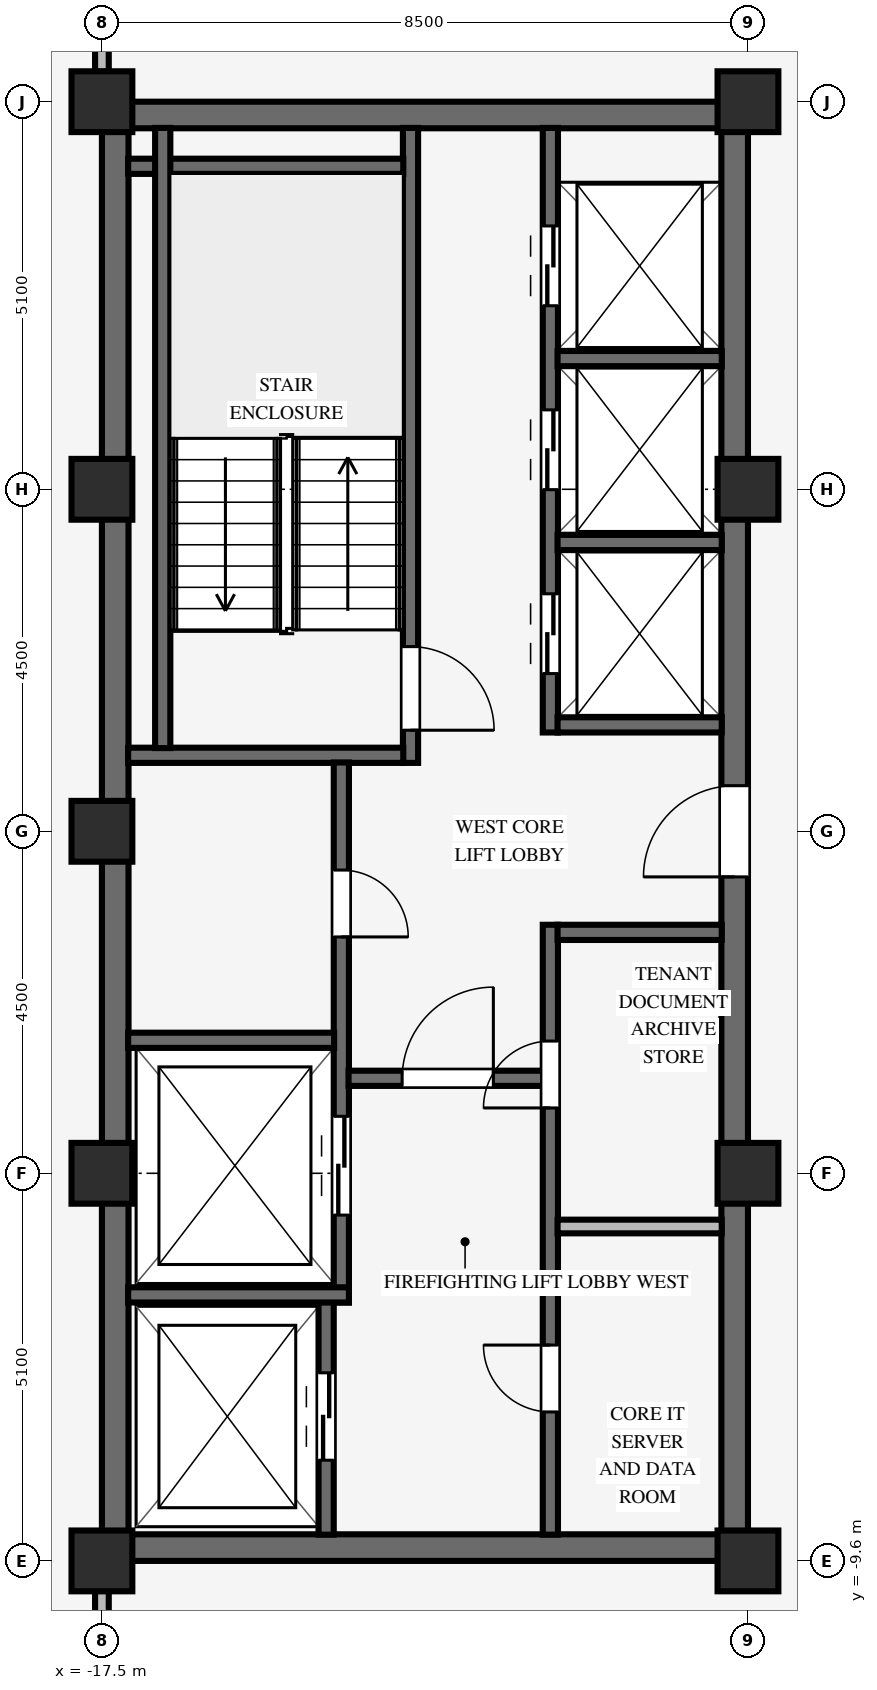
"""IFC4 building model, lengths in metres.
Left out: names, types, materials, properties, quantities, classifications, styles, units other than length and angle.
Written with IfcOpenShell. Run it as: python <this file> out.ifc"""

import sys

from ifc_helpers import new_model, si_unit, direction, frame, frame_2d, origin, origin_2d, place, context, subcontext, project, spatial, rectangle, extrude, source, transform, mapped, element, fill, save


model = new_model("IFC4")
c1 = context("Model", 3, precision=1e-05, world=origin(), true_north=direction((0.0, 1.0)))
c2 = subcontext(c1, "Body", "Model", "MODEL_VIEW")
j1 = project(units=[si_unit("LENGTHUNIT", "METRE"), si_unit("PLANEANGLEUNIT", "RADIAN")], contexts=[c1])
p1 = place(None, origin())
s1 = spatial("IfcSite", under=j1, at=p1, CompositionType="ELEMENT")
p2 = place(p1, origin())
s2 = spatial("IfcBuilding", under=s1, at=p2, CompositionType="ELEMENT")
p3 = place(p2, frame((0.0, 0.0, 245.65)))
s3 = spatial("IfcBuildingStorey", under=s2, at=p3, CompositionType="ELEMENT", Elevation=245.65)
for number, where, z_axis, x_axis in (
    (1, (-17.5, -9.425, 0.0), (0.0, 0.0, 1.0), (1.0, 0.0, 0.0)),
    (2, (-17.5, 9.425, 0.0), (0.0, 0.0, 1.0), (1.0, 0.0, 0.0)),
):
    element("IfcWall", number, at=place(p3, frame(where, z_axis=z_axis, x_axis=x_axis)), inside=s3, PredefinedType="SHEAR", context=c2, shape_type="SweptSolid", body=[
        extrude(rectangle(XDim=8.5, YDim=0.35, at=frame_2d((4.25, 0.0))), origin(), (0.0, 0.0, 1.0), 3.37),
    ])
p4 = place(p3, frame((-17.325, -9.255, 0.0), z_axis=(0.0, 0.0, 1.0), x_axis=(0.0, 1.0, 0.0)))
e3 = element("IfcWall", 3, at=p4, inside=s3, PredefinedType="SHEAR", context=c2, shape_type="SweptSolid", body=[
    extrude(rectangle(XDim=18.51, YDim=0.35, at=frame_2d((9.255, 0.0))), origin(), (0.0, 0.0, 1.0), 3.37),
])
p5 = place(p3, frame((-9.175, -9.255, 0.0), z_axis=(0.0, 0.0, 1.0), x_axis=(0.0, 1.0, 0.0)))
e4 = element("IfcWall", 4, at=p5, inside=s3, PredefinedType="SHEAR", context=c2, shape_type="SweptSolid", body=[
    extrude(rectangle(XDim=18.51, YDim=0.35, at=frame_2d((9.255, 0.0))), origin(), (0.0, 0.0, 1.0), 3.37),
])
p6 = place(p5, frame((8.655, 0.0, 0.0)))
e5 = element("IfcOpeningElement", 5, at=p6, cuts=e4, PredefinedType="OPENING", context=c2, shape_type="SweptSolid", body=[
    extrude(rectangle(XDim=1.2, YDim=2.15, at=frame_2d((0.6, 1.075))), frame((0.0, 0.185, 0.0), z_axis=(0.0, -1.0, 0.0), x_axis=(1.0, 0.0, 0.0)), (0.0, 0.0, 1.0), 0.37),
])
for number, where, z_axis, x_axis in (
    (6, (-17.5, -9.6, 0.0), (0.0, 0.0, 1.0), (1.0, 0.0, 0.0)),
    (7, (-17.5, -4.5, 0.0), (0.0, 0.0, 1.0), (1.0, 0.0, 0.0)),
    (8, (-17.5, 4.5, 0.0), (0.0, 0.0, 1.0), (1.0, 0.0, 0.0)),
    (9, (-17.5, 9.6, 0.0), (0.0, 0.0, 1.0), (1.0, 0.0, 0.0)),
    (10, (-9.0, -9.6, 0.0), (0.0, 0.0, 1.0), (1.0, 0.0, 0.0)),
    (11, (-9.0, -4.5, 0.0), (0.0, 0.0, 1.0), (1.0, 0.0, 0.0)),
    (12, (-9.0, 4.5, 0.0), (0.0, 0.0, 1.0), (1.0, 0.0, 0.0)),
    (13, (-9.0, 9.6, 0.0), (0.0, 0.0, 1.0), (1.0, 0.0, 0.0)),
    (14, (-17.5, 0.0, 0.0), (0.0, 0.0, 1.0), (1.0, 0.0, 0.0)),
):
    element("IfcColumn", number, at=place(p3, frame(where, z_axis=z_axis, x_axis=x_axis)), inside=s3, PredefinedType="COLUMN", context=c2, shape_type="SweptSolid", body=[
        extrude(rectangle(XDim=0.8, YDim=0.8, at=origin_2d()), origin(), (0.0, 0.0, 1.0), 3.37),
    ])
p7 = place(p3, frame((-13.44, 0.9, 0.0), z_axis=(0.0, 0.0, 1.0), x_axis=(0.0, 1.0, 0.0)))
e15 = element("IfcWall", 15, at=p7, inside=s3, PredefinedType="SHEAR", context=c2, shape_type="SweptSolid", body=[
    extrude(rectangle(XDim=8.355, YDim=0.2, at=frame_2d((4.177, 0.0))), origin(), (0.0, 0.0, 1.0), 3.37),
])
p8 = place(p7, frame((1.53, 0.0, 0.0), z_axis=(0.0, 0.0, 1.0), x_axis=(-1.0, 0.0, 0.0)))
e16 = element("IfcOpeningElement", 16, at=p8, cuts=e15, PredefinedType="OPENING", context=c2, shape_type="SweptSolid", body=[
    extrude(rectangle(XDim=1.1, YDim=2.15, at=frame_2d((0.55, 1.075))), frame((0.0, 0.11, 0.0), z_axis=(0.0, -1.0, 0.0), x_axis=(1.0, 0.0, 0.0)), (0.0, 0.0, 1.0), 0.22),
])
for number, where, z_axis, x_axis in (
    (17, (-17.155, 1.0, 0.0), (0.0, 0.0, 1.0), (1.0, 0.0, 0.0)),
    (18, (-17.155, 8.75, 0.0), (0.0, 0.0, 1.0), (1.0, 0.0, 0.0)),
):
    element("IfcWall", number, at=place(p3, frame(where, z_axis=z_axis, x_axis=x_axis)), inside=s3, PredefinedType="SHEAR", context=c2, shape_type="SweptSolid", body=[
        extrude(rectangle(XDim=3.62, YDim=0.2, at=frame_2d((1.81, 0.0))), origin(), (0.0, 0.0, 1.0), 3.37),
    ])
p9 = place(p3, frame((-16.7, 1.095, 0.0), z_axis=(0.0, 0.0, 1.0), x_axis=(0.0, 1.0, 0.0)))
e19 = element("IfcWall", 19, at=p9, inside=s3, PredefinedType="SHEAR", context=c2, shape_type="SweptSolid", body=[
    extrude(rectangle(XDim=8.16, YDim=0.2, at=frame_2d((4.08, 0.0))), origin(), (0.0, 0.0, 1.0), 3.37),
])
p10 = place(p3, frame((-14.55, -9.255, 0.0), z_axis=(0.0, 0.0, 1.0), x_axis=(0.0, 1.0, 0.0)))
e20 = element("IfcWall", 20, at=p10, inside=s3, PredefinedType="SHEAR", context=c2, shape_type="SweptSolid", body=[
    extrude(rectangle(XDim=3.06, YDim=0.2, at=frame_2d((1.53, 0.0))), origin(), (0.0, 0.0, 1.0), 3.37),
])
p11 = place(p10, frame((0.98, 0.0, 0.0)))
e21 = element("IfcOpeningElement", 21, at=p11, cuts=e20, PredefinedType="OPENING", context=c2, shape_type="SweptSolid", body=[
    extrude(rectangle(XDim=1.15, YDim=2.15, at=frame_2d((0.575, 1.075))), frame((0.0, 0.11, 0.0), z_axis=(0.0, -1.0, 0.0), x_axis=(1.0, 0.0, 0.0)), (0.0, 0.0, 1.0), 0.22),
])
p12 = place(p3, frame((-14.35, -6.2, 0.0), z_axis=(0.0, 0.0, 1.0), x_axis=(0.0, 1.0, 0.0)))
e22 = element("IfcWall", 22, at=p12, inside=s3, PredefinedType="SHEAR", context=c2, shape_type="SweptSolid", body=[
    extrude(rectangle(XDim=7.105, YDim=0.2, at=frame_2d((3.552, 0.0))), origin(), (0.0, 0.0, 1.0), 3.37),
])
p13 = place(p12, frame((5.69, 0.0, 0.0), z_axis=(0.0, 0.0, 1.0), x_axis=(-1.0, 0.0, 0.0)))
e23 = element("IfcOpeningElement", 23, at=p13, cuts=e22, PredefinedType="OPENING", context=c2, shape_type="SweptSolid", body=[
    extrude(rectangle(XDim=0.88, YDim=2.1, at=frame_2d((0.44, 1.05))), frame((0.0, 0.11, 0.0), z_axis=(0.0, -1.0, 0.0), x_axis=(1.0, 0.0, 0.0)), (0.0, 0.0, 1.0), 0.22),
])
p14 = place(p12, frame((1.15, 0.0, 0.0)))
e24 = element("IfcOpeningElement", 24, at=p14, cuts=e22, PredefinedType="OPENING", context=c2, shape_type="SweptSolid", body=[
    extrude(rectangle(XDim=1.3, YDim=2.2, at=frame_2d((0.65, 1.1))), frame((0.0, 0.11, 0.0), z_axis=(0.0, -1.0, 0.0), x_axis=(1.0, 0.0, 0.0)), (0.0, 0.0, 1.0), 0.22),
])
p15 = place(p3, frame((-17.155, -6.1, 0.0), z_axis=(0.0, 0.0, 1.0), x_axis=(1.0, 0.0, 0.0)))
e25 = element("IfcWall", 25, at=p15, inside=s3, PredefinedType="SHEAR", context=c2, shape_type="SweptSolid", body=[
    extrude(rectangle(XDim=2.905, YDim=0.2, at=frame_2d((1.453, 0.0))), origin(), (0.0, 0.0, 1.0), 3.37),
])
p16 = place(p3, frame((-17.155, -2.75, 0.0), z_axis=(0.0, 0.0, 1.0), x_axis=(1.0, 0.0, 0.0)))
e26 = element("IfcWall", 26, at=p16, inside=s3, PredefinedType="SHEAR", context=c2, shape_type="SweptSolid", body=[
    extrude(rectangle(XDim=2.71, YDim=0.2, at=frame_2d((1.355, 0.0))), origin(), (0.0, 0.0, 1.0), 3.37),
])
p17 = place(p3, frame((-11.6, -9.255, 0.0), z_axis=(0.0, 0.0, 1.0), x_axis=(0.0, 1.0, 0.0)))
e27 = element("IfcWall", 27, at=p17, inside=s3, PredefinedType="SHEAR", context=c2, shape_type="SweptSolid", body=[
    extrude(rectangle(XDim=8.025, YDim=0.2, at=frame_2d((4.012, 0.0))), origin(), (0.0, 0.0, 1.0), 3.37),
])
p18 = place(p17, frame((1.615, 0.0, 0.0)))
e28 = element("IfcOpeningElement", 28, at=p18, cuts=e27, PredefinedType="OPENING", context=c2, shape_type="SweptSolid", body=[
    extrude(rectangle(XDim=0.88, YDim=2.1, at=frame_2d((0.44, 1.05))), frame((0.0, 0.11, 0.0), z_axis=(0.0, -1.0, 0.0), x_axis=(1.0, 0.0, 0.0)), (0.0, 0.0, 1.0), 0.22),
])
p19 = place(p17, frame((5.615, 0.0, 0.0)))
e29 = element("IfcOpeningElement", 29, at=p19, cuts=e27, PredefinedType="OPENING", context=c2, shape_type="SweptSolid", body=[
    extrude(rectangle(XDim=0.88, YDim=2.1, at=frame_2d((0.44, 1.05))), frame((0.0, 0.11, 0.0), z_axis=(0.0, -1.0, 0.0), x_axis=(1.0, 0.0, 0.0)), (0.0, 0.0, 1.0), 0.22),
])
p20 = place(p3, frame((-14.255, -3.25, 0.0), z_axis=(0.0, 0.0, 1.0), x_axis=(1.0, 0.0, 0.0)))
e30 = element("IfcWall", 30, at=p20, inside=s3, PredefinedType="SHEAR", context=c2, shape_type="SweptSolid", body=[
    extrude(rectangle(XDim=2.56, YDim=0.2, at=frame_2d((1.28, 0.0))), origin(), (0.0, 0.0, 1.0), 3.37),
])
p21 = place(p20, frame((0.705, 0.0, 0.0)))
e31 = element("IfcOpeningElement", 31, at=p21, cuts=e30, PredefinedType="OPENING", context=c2, shape_type="SweptSolid", body=[
    extrude(rectangle(XDim=1.2, YDim=2.15, at=frame_2d((0.6, 1.075))), frame((0.0, 0.11, 0.0), z_axis=(0.0, -1.0, 0.0), x_axis=(1.0, 0.0, 0.0)), (0.0, 0.0, 1.0), 0.22),
])
p22 = place(p3, frame((-11.505, -1.33, 0.0), z_axis=(0.0, 0.0, 1.0), x_axis=(1.0, 0.0, 0.0)))
e32 = element("IfcWall", 32, at=p22, inside=s3, PredefinedType="SHEAR", context=c2, shape_type="SweptSolid", body=[
    extrude(rectangle(XDim=2.16, YDim=0.2, at=frame_2d((1.08, 0.0))), origin(), (0.0, 0.0, 1.0), 3.37),
])
p23 = place(p3, frame((-11.505, -5.2, 0.0), z_axis=(0.0, 0.0, 1.0), x_axis=(1.0, 0.0, 0.0)))
e33 = element("IfcWall", 33, at=p23, inside=s3, PredefinedType="PARTITIONING", context=c2, shape_type="SweptSolid", body=[
    extrude(rectangle(XDim=2.16, YDim=0.18, at=frame_2d((1.08, 0.0))), origin(), (0.0, 0.0, 1.0), 3.36),
])
p24 = place(p3, frame((-11.6, 1.3, 0.0), z_axis=(0.0, 0.0, 1.0), x_axis=(0.0, 1.0, 0.0)))
e34 = element("IfcWall", 34, at=p24, inside=s3, PredefinedType="SHEAR", context=c2, shape_type="SweptSolid", body=[
    extrude(rectangle(XDim=7.955, YDim=0.2, at=frame_2d((3.978, 0.0))), origin(), (0.0, 0.0, 1.0), 3.37),
])
p25 = place(p24, frame((0.775, 0.0, 0.0)))
e35 = element("IfcOpeningElement", 35, at=p25, cuts=e34, PredefinedType="OPENING", context=c2, shape_type="SweptSolid", body=[
    extrude(rectangle(XDim=1.05, YDim=2.15, at=frame_2d((0.525, 1.075))), frame((0.0, 0.11, 0.0), z_axis=(0.0, -1.0, 0.0), x_axis=(1.0, 0.0, 0.0)), (0.0, 0.0, 1.0), 0.22),
])
p26 = place(p24, frame((3.195, 0.0, 0.0)))
e36 = element("IfcOpeningElement", 36, at=p26, cuts=e34, PredefinedType="OPENING", context=c2, shape_type="SweptSolid", body=[
    extrude(rectangle(XDim=1.05, YDim=2.15, at=frame_2d((0.525, 1.075))), frame((0.0, 0.11, 0.0), z_axis=(0.0, -1.0, 0.0), x_axis=(1.0, 0.0, 0.0)), (0.0, 0.0, 1.0), 0.22),
])
p27 = place(p24, frame((5.615, 0.0, 0.0)))
e37 = element("IfcOpeningElement", 37, at=p27, cuts=e34, PredefinedType="OPENING", context=c2, shape_type="SweptSolid", body=[
    extrude(rectangle(XDim=1.05, YDim=2.15, at=frame_2d((0.525, 1.075))), frame((0.0, 0.11, 0.0), z_axis=(0.0, -1.0, 0.0), x_axis=(1.0, 0.0, 0.0)), (0.0, 0.0, 1.0), 0.22),
])
for number, where, z_axis, x_axis in (
    (38, (-11.505, 1.4, 0.0), (0.0, 0.0, 1.0), (1.0, 0.0, 0.0)),
    (39, (-11.505, 3.8, 0.0), (0.0, 0.0, 1.0), (1.0, 0.0, 0.0)),
    (40, (-11.505, 6.22, 0.0), (0.0, 0.0, 1.0), (1.0, 0.0, 0.0)),
):
    element("IfcWall", number, at=place(p3, frame(where, z_axis=z_axis, x_axis=x_axis)), inside=s3, PredefinedType="SHEAR", context=c2, shape_type="SweptSolid", body=[
        extrude(rectangle(XDim=2.16, YDim=0.2, at=frame_2d((1.08, 0.0))), origin(), (0.0, 0.0, 1.0), 3.37),
    ])
for number, where, z_axis, x_axis in (
    (41, (-17.5, -11.114, 0.0), (0.0, 0.0, 1.0), (0.0, 1.0, 0.0)),
    (42, (-17.5, 9.996, 0.0), (0.0, 0.0, 1.0), (0.0, 1.0, 0.0)),
):
    element("IfcWall", number, at=place(p3, frame(where, z_axis=z_axis, x_axis=x_axis)), inside=s3, PredefinedType="PARTITIONING", context=c2, shape_type="SweptSolid", body=[
        extrude(rectangle(XDim=1.118, YDim=0.18, at=frame_2d((0.559, 0.0))), origin(), (0.0, 0.0, 1.0), 2.892),
    ])
m1 = source(origin(), c2, "Body", "SweptSolid", [
    extrude(rectangle(XDim=1.1, YDim=2.15, at=frame_2d((0.55, 1.075))), frame((0.0, 0.025, 0.0), z_axis=(0.0, -1.0, 0.0), x_axis=(1.0, 0.0, 0.0)), (0.0, 0.0, 1.0), 0.05),
])
p28 = place(p8, origin())
e43 = element("IfcDoor", 43, at=p28, inside=s3, OperationType="SINGLE_SWING_RIGHT", PredefinedType="DOOR", context=c2, shape_type="MappedRepresentation", body=[
    mapped(m1, transform((0.0, 0.0, 0.0), scale=1.0)),
])
fill(e16, e43)
m2 = source(origin(), c2, "Body", "SweptSolid", [
    extrude(rectangle(XDim=0.88, YDim=2.1, at=frame_2d((0.44, 1.05))), frame((0.0, 0.025, 0.0), z_axis=(0.0, -1.0, 0.0), x_axis=(1.0, 0.0, 0.0)), (0.0, 0.0, 1.0), 0.05),
])
p29 = place(p13, origin())
e44 = element("IfcDoor", 44, at=p29, inside=s3, OperationType="SINGLE_SWING_RIGHT", PredefinedType="DOOR", context=c2, shape_type="MappedRepresentation", body=[
    mapped(m2, transform((0.0, 0.0, 0.0), scale=1.0)),
])
fill(e23, e44)
m3 = source(origin(), c2, "Body", "SweptSolid", [
    extrude(rectangle(XDim=1.2, YDim=2.15, at=frame_2d((0.6, 1.075))), frame((0.0, 0.025, 0.0), z_axis=(0.0, -1.0, 0.0), x_axis=(1.0, 0.0, 0.0)), (0.0, 0.0, 1.0), 0.05),
])
p30 = place(p21, origin())
e45 = element("IfcDoor", 45, at=p30, inside=s3, OperationType="SINGLE_SWING_RIGHT", PredefinedType="DOOR", context=c2, shape_type="MappedRepresentation", body=[
    mapped(m3, transform((0.0, 0.0, 0.0), scale=1.0)),
])
fill(e31, e45)
p31 = place(p18, origin())
e46 = element("IfcDoor", 46, at=p31, inside=s3, OperationType="SINGLE_SWING_RIGHT", PredefinedType="DOOR", context=c2, shape_type="MappedRepresentation", body=[
    mapped(m2, transform((0.0, 0.0, 0.0), scale=1.0)),
])
fill(e28, e46)
p32 = place(p19, origin())
e47 = element("IfcDoor", 47, at=p32, inside=s3, OperationType="SINGLE_SWING_LEFT", PredefinedType="DOOR", context=c2, shape_type="MappedRepresentation", body=[
    mapped(m2, transform((0.0, 0.0, 0.0), scale=1.0)),
])
fill(e29, e47)
p33 = place(p6, origin())
e48 = element("IfcDoor", 48, at=p33, inside=s3, OperationType="SINGLE_SWING_LEFT", PredefinedType="DOOR", context=c2, shape_type="MappedRepresentation", body=[
    mapped(m3, transform((0.0, 0.0, 0.0), scale=1.0)),
])
fill(e5, e48)
m4 = source(origin(), c2, "Body", "SweptSolid", [
    extrude(rectangle(XDim=1.15, YDim=2.15, at=frame_2d((0.575, 1.075))), frame((0.0, 0.025, 0.0), z_axis=(0.0, -1.0, 0.0), x_axis=(1.0, 0.0, 0.0)), (0.0, 0.0, 1.0), 0.05),
])
p34 = place(p11, origin())
e49 = element("IfcDoor", 49, at=p34, inside=s3, OperationType="DOUBLE_DOOR_SLIDING", PredefinedType="DOOR", context=c2, shape_type="MappedRepresentation", body=[
    mapped(m4, transform((0.0, 0.0, 0.0), scale=1.0)),
])
fill(e21, e49)
m5 = source(origin(), c2, "Body", "SweptSolid", [
    extrude(rectangle(XDim=1.3, YDim=2.2, at=frame_2d((0.65, 1.1))), frame((0.0, 0.025, 0.0), z_axis=(0.0, -1.0, 0.0), x_axis=(1.0, 0.0, 0.0)), (0.0, 0.0, 1.0), 0.05),
])
p35 = place(p14, origin())
e50 = element("IfcDoor", 50, at=p35, inside=s3, OperationType="DOUBLE_DOOR_SLIDING", PredefinedType="DOOR", context=c2, shape_type="MappedRepresentation", body=[
    mapped(m5, transform((0.0, 0.0, 0.0), scale=1.0)),
])
fill(e24, e50)
m6 = source(origin(), c2, "Body", "SweptSolid", [
    extrude(rectangle(XDim=1.05, YDim=2.15, at=frame_2d((0.525, 1.075))), frame((0.0, 0.025, 0.0), z_axis=(0.0, -1.0, 0.0), x_axis=(1.0, 0.0, 0.0)), (0.0, 0.0, 1.0), 0.05),
])
p36 = place(p25, origin())
e51 = element("IfcDoor", 51, at=p36, inside=s3, OperationType="DOUBLE_DOOR_SLIDING", PredefinedType="DOOR", context=c2, shape_type="MappedRepresentation", body=[
    mapped(m6, transform((0.0, 0.0, 0.0), scale=1.0)),
])
fill(e35, e51)
p37 = place(p26, origin())
e52 = element("IfcDoor", 52, at=p37, inside=s3, OperationType="DOUBLE_DOOR_SLIDING", PredefinedType="DOOR", context=c2, shape_type="MappedRepresentation", body=[
    mapped(m6, transform((0.0, 0.0, 0.0), scale=1.0)),
])
fill(e36, e52)
p38 = place(p27, origin())
e53 = element("IfcDoor", 53, at=p38, inside=s3, OperationType="DOUBLE_DOOR_SLIDING", PredefinedType="DOOR", context=c2, shape_type="MappedRepresentation", body=[
    mapped(m6, transform((0.0, 0.0, 0.0), scale=1.0)),
])
fill(e37, e53)
save(model, sys.argv[1])
